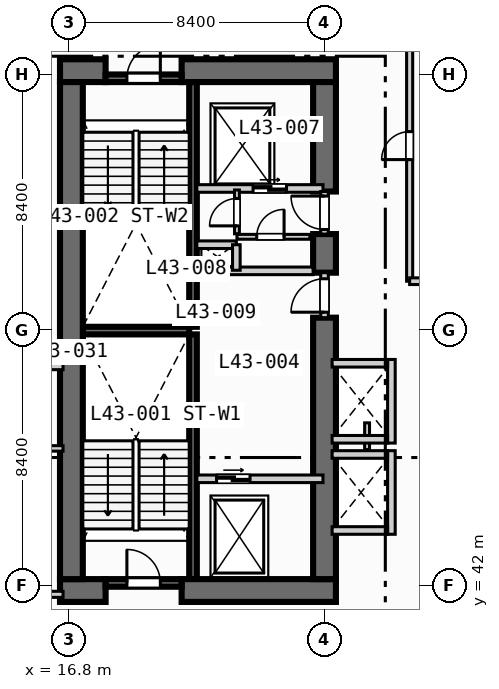
"""IFC4 building model, lengths in metres.
Left out: names, types, materials, properties, quantities, classifications, styles, units other than length and angle.
Written with IfcOpenShell. Run it as: python <this file> out.ifc"""

import sys

from ifc_helpers import new_model, si_unit, direction, frame, frame_2d, origin, place, context, subcontext, project, spatial, rectangle, extrude, element, fill, save


model = new_model("IFC4")
c1 = context("Model", 3, precision=1e-05, world=origin(), true_north=direction((0.0, 1.0)))
c2 = subcontext(c1, "Body", "Model", "MODEL_VIEW")
j1 = project(units=[si_unit("LENGTHUNIT", "METRE"), si_unit("PLANEANGLEUNIT", "RADIAN")], contexts=[c1])
p1 = place(None, origin())
s1 = spatial("IfcSite", under=j1, at=p1, CompositionType="ELEMENT")
p2 = place(p1, origin())
s2 = spatial("IfcBuilding", under=s1, at=p2, CompositionType="ELEMENT")
p3 = place(p2, frame((0.0, 0.0, 179.1)))
s3 = spatial("IfcBuildingStorey", under=s2, at=p3, CompositionType="ELEMENT", Elevation=179.1)
for number, where, z_axis, x_axis in (
    (1, (20.875, 42.2, 0.0), (0.0, 0.0, 1.0), (0.0, 1.0, 0.0)),
    (2, (20.875, 50.5, 0.0), (0.0, 0.0, 1.0), (0.0, 1.0, 0.0)),
):
    element("IfcWall", number, at=place(p3, frame(where, z_axis=z_axis, x_axis=x_axis)), inside=s3, PredefinedType="SOLIDWALL", context=c2, shape_type="SweptSolid", body=[
        extrude(rectangle(XDim=8.05, YDim=0.25, at=frame_2d((4.025, 0.0))), origin(), (0.0, 0.0, 1.0), 3.47),
    ])
p4 = place(p3, frame((17.25, 50.375, 0.0), z_axis=(0.0, 0.0, 1.0), x_axis=(1.0, 0.0, 0.0)))
e3 = element("IfcWall", 3, at=p4, inside=s3, PredefinedType="SOLIDWALL", context=c2, shape_type="SweptSolid", body=[
    extrude(rectangle(XDim=3.5, YDim=0.25, at=frame_2d((1.75, 0.0))), origin(), (0.0, 0.0, 1.0), 3.47),
])
p5 = place(p3, frame((16.5, 41.825, 0.0), z_axis=(0.0, 0.0, 1.0), x_axis=(1.0, 0.0, 0.0)))
e4 = element("IfcWall", 4, at=p5, inside=s3, PredefinedType="SHEAR", context=c2, shape_type="SweptSolid", body=[
    extrude(rectangle(XDim=1.5, YDim=0.75, at=frame_2d((0.75, 0.0))), origin(), (0.0, 0.0, 1.0), 3.47),
])
p6 = place(p3, frame((20.5, 41.825, 0.0), z_axis=(0.0, 0.0, 1.0), x_axis=(1.0, 0.0, 0.0)))
e5 = element("IfcWall", 5, at=p6, inside=s3, PredefinedType="SHEAR", context=c2, shape_type="SweptSolid", body=[
    extrude(rectangle(XDim=5.075, YDim=0.75, at=frame_2d((2.538, 0.0))), origin(), (0.0, 0.0, 1.0), 3.47),
])
p7 = place(p3, frame((16.5, 58.925, 0.0), z_axis=(0.0, 0.0, 1.0), x_axis=(1.0, 0.0, 0.0)))
e6 = element("IfcWall", 6, at=p7, inside=s3, PredefinedType="SHEAR", context=c2, shape_type="SweptSolid", body=[
    extrude(rectangle(XDim=1.5, YDim=0.75, at=frame_2d((0.75, 0.0))), origin(), (0.0, 0.0, 1.0), 3.47),
])
p8 = place(p3, frame((20.5, 58.925, 0.0), z_axis=(0.0, 0.0, 1.0), x_axis=(1.0, 0.0, 0.0)))
e7 = element("IfcWall", 7, at=p8, inside=s3, PredefinedType="SHEAR", context=c2, shape_type="SweptSolid", body=[
    extrude(rectangle(XDim=5.075, YDim=0.75, at=frame_2d((2.538, 0.0))), origin(), (0.0, 0.0, 1.0), 3.47),
])
p9 = place(p3, frame((16.875, 42.2, 0.0), z_axis=(0.0, 0.0, 1.0), x_axis=(0.0, 1.0, 0.0)))
e8 = element("IfcWall", 8, at=p9, inside=s3, PredefinedType="SHEAR", context=c2, shape_type="SweptSolid", body=[
    extrude(rectangle(XDim=16.35, YDim=0.75, at=frame_2d((8.175, 0.0))), origin(), (0.0, 0.0, 1.0), 3.47),
])
p10 = place(p3, frame((25.2, 42.2, 0.0), z_axis=(0.0, 0.0, 1.0), x_axis=(0.0, 1.0, 0.0)))
e9 = element("IfcWall", 9, at=p10, inside=s3, PredefinedType="SHEAR", context=c2, shape_type="SweptSolid", body=[
    extrude(rectangle(XDim=8.6, YDim=0.75, at=frame_2d((4.3, 0.0))), origin(), (0.0, 0.0, 1.0), 3.47),
])
p11 = place(p3, frame((25.2, 52.28, 0.0), z_axis=(0.0, 0.0, 1.0), x_axis=(0.0, 1.0, 0.0)))
e10 = element("IfcWall", 10, at=p11, inside=s3, PredefinedType="SHEAR", context=c2, shape_type="SweptSolid", body=[
    extrude(rectangle(XDim=1.27, YDim=0.75, at=frame_2d((0.635, 0.0))), origin(), (0.0, 0.0, 1.0), 3.47),
])
p12 = place(p3, frame((25.2, 54.95, 0.0), z_axis=(0.0, 0.0, 1.0), x_axis=(0.0, 1.0, 0.0)))
e11 = element("IfcWall", 11, at=p12, inside=s3, PredefinedType="SHEAR", context=c2, shape_type="SweptSolid", body=[
    extrude(rectangle(XDim=3.6, YDim=0.75, at=frame_2d((1.8, 0.0))), origin(), (0.0, 0.0, 1.0), 3.47),
])
p13 = place(p3, frame((18.0, 42.075, 0.0), z_axis=(0.0, 0.0, 1.0), x_axis=(1.0, 0.0, 0.0)))
e12 = element("IfcWall", 12, at=p13, inside=s3, PredefinedType="SOLIDWALL", context=c2, shape_type="SweptSolid", body=[
    extrude(rectangle(XDim=2.5, YDim=0.25, at=frame_2d((1.25, 0.0))), origin(), (0.0, 0.0, 1.0), 3.47),
])
p14 = place(p13, frame((0.7, 0.0, 0.0)))
e13 = element("IfcOpeningElement", 13, at=p14, cuts=e12, PredefinedType="OPENING", context=c2, shape_type="SweptSolid", body=[
    extrude(rectangle(XDim=1.1, YDim=2.15, at=frame_2d((0.55, 1.075))), frame((0.0, 0.135, 0.0), z_axis=(0.0, -1.0, 0.0), x_axis=(1.0, 0.0, 0.0)), (0.0, 0.0, 1.0), 0.27),
])
p15 = place(p3, frame((18.0, 58.675, 0.0), z_axis=(0.0, 0.0, 1.0), x_axis=(1.0, 0.0, 0.0)))
e14 = element("IfcWall", 14, at=p15, inside=s3, PredefinedType="SOLIDWALL", context=c2, shape_type="SweptSolid", body=[
    extrude(rectangle(XDim=2.5, YDim=0.25, at=frame_2d((1.25, 0.0))), origin(), (0.0, 0.0, 1.0), 3.47),
])
p16 = place(p15, frame((0.7, 0.0, 0.0)))
e15 = element("IfcOpeningElement", 15, at=p16, cuts=e14, PredefinedType="OPENING", context=c2, shape_type="SweptSolid", body=[
    extrude(rectangle(XDim=1.1, YDim=2.15, at=frame_2d((0.55, 1.075))), frame((0.0, 0.135, 0.0), z_axis=(0.0, -1.0, 0.0), x_axis=(1.0, 0.0, 0.0)), (0.0, 0.0, 1.0), 0.27),
])
p17 = place(p3, frame((21.0, 45.5, 0.0), z_axis=(0.0, 0.0, 1.0), x_axis=(1.0, 0.0, 0.0)))
e16 = element("IfcWall", 16, at=p17, inside=s3, PredefinedType="SOLIDWALL", context=c2, shape_type="SweptSolid", body=[
    extrude(rectangle(XDim=4.15, YDim=0.25, at=frame_2d((2.075, 0.0))), origin(), (0.0, 0.0, 1.0), 3.47),
])
p18 = place(p17, frame((0.65, 0.0, 0.0)))
e17 = element("IfcOpeningElement", 17, at=p18, cuts=e16, PredefinedType="OPENING", context=c2, shape_type="SweptSolid", body=[
    extrude(rectangle(XDim=1.1, YDim=2.15, at=frame_2d((0.55, 1.075))), frame((0.0, 0.135, 0.0), z_axis=(0.0, -1.0, 0.0), x_axis=(1.0, 0.0, 0.0)), (0.0, 0.0, 1.0), 0.27),
])
p19 = place(p3, frame((25.2, 50.8, 0.0), z_axis=(0.0, 0.0, 1.0), x_axis=(0.0, 1.0, 0.0)))
e18 = element("IfcWall", 18, at=p19, inside=s3, PredefinedType="SOLIDWALL", context=c2, shape_type="SweptSolid", body=[
    extrude(rectangle(XDim=1.48, YDim=0.25, at=frame_2d((0.74, 0.0))), origin(), (0.0, 0.0, 1.0), 3.47),
])
p20 = place(p19, frame((0.18, 0.0, 0.0)))
e19 = element("IfcOpeningElement", 19, at=p20, cuts=e18, PredefinedType="OPENING", context=c2, shape_type="SweptSolid", body=[
    extrude(rectangle(XDim=1.1, YDim=2.15, at=frame_2d((0.55, 1.075))), frame((0.0, 0.135, 0.0), z_axis=(0.0, -1.0, 0.0), x_axis=(1.0, 0.0, 0.0)), (0.0, 0.0, 1.0), 0.27),
])
p21 = place(p3, frame((21.0, 52.34, 0.0), z_axis=(0.0, 0.0, 1.0), x_axis=(1.0, 0.0, 0.0)))
e20 = element("IfcWall", 20, at=p21, inside=s3, PredefinedType="SOLIDWALL", context=c2, shape_type="SweptSolid", body=[
    extrude(rectangle(XDim=3.825, YDim=0.25, at=frame_2d((1.913, 0.0))), origin(), (0.0, 0.0, 1.0), 3.47),
])
p22 = place(p3, frame((21.0, 55.05, 0.0), z_axis=(0.0, 0.0, 1.0), x_axis=(1.0, 0.0, 0.0)))
e21 = element("IfcWall", 21, at=p22, inside=s3, PredefinedType="SOLIDWALL", context=c2, shape_type="SweptSolid", body=[
    extrude(rectangle(XDim=4.15, YDim=0.25, at=frame_2d((2.075, 0.0))), origin(), (0.0, 0.0, 1.0), 3.47),
])
p23 = place(p22, frame((1.85, 0.0, 0.0)))
e22 = element("IfcOpeningElement", 22, at=p23, cuts=e21, PredefinedType="OPENING", context=c2, shape_type="SweptSolid", body=[
    extrude(rectangle(XDim=1.1, YDim=2.15, at=frame_2d((0.55, 1.075))), frame((0.0, 0.135, 0.0), z_axis=(0.0, -1.0, 0.0), x_axis=(1.0, 0.0, 0.0)), (0.0, 0.0, 1.0), 0.27),
])
p24 = place(p3, frame((25.2, 53.55, 0.0), z_axis=(0.0, 0.0, 1.0), x_axis=(0.0, 1.0, 0.0)))
e23 = element("IfcWall", 23, at=p24, inside=s3, PredefinedType="SOLIDWALL", context=c2, shape_type="SweptSolid", body=[
    extrude(rectangle(XDim=1.4, YDim=0.25, at=frame_2d((0.7, 0.0))), origin(), (0.0, 0.0, 1.0), 3.47),
])
p25 = place(p24, frame((0.15, 0.0, 0.0)))
e24 = element("IfcOpeningElement", 24, at=p25, cuts=e23, PredefinedType="OPENING", context=c2, shape_type="SweptSolid", body=[
    extrude(rectangle(XDim=1.1, YDim=2.15, at=frame_2d((0.55, 1.075))), frame((0.0, 0.135, 0.0), z_axis=(0.0, -1.0, 0.0), x_axis=(1.0, 0.0, 0.0)), (0.0, 0.0, 1.0), 0.27),
])
p26 = place(p3, frame((21.0, 53.2, 0.0), z_axis=(0.0, 0.0, 1.0), x_axis=(1.0, 0.0, 0.0)))
e25 = element("IfcWall", 25, at=p26, inside=s3, PredefinedType="SOLIDWALL", context=c2, shape_type="SweptSolid", body=[
    extrude(rectangle(XDim=1.3, YDim=0.25, at=frame_2d((0.65, 0.0))), origin(), (0.0, 0.0, 1.0), 3.47),
])
p27 = place(p3, frame((22.3, 52.36, 0.0), z_axis=(0.0, 0.0, 1.0), x_axis=(0.0, 1.0, 0.0)))
e26 = element("IfcWall", 26, at=p27, inside=s3, PredefinedType="SOLIDWALL", context=c2, shape_type="SweptSolid", body=[
    extrude(rectangle(XDim=0.84, YDim=0.25, at=frame_2d((0.42, 0.0))), origin(), (0.0, 0.0, 1.0), 3.47),
])
p28 = place(p3, frame((22.32, 53.56, 0.0), z_axis=(0.0, 0.0, 1.0), x_axis=(0.0, 1.0, 0.0)))
e27 = element("IfcWall", 27, at=p28, inside=s3, PredefinedType="PARTITIONING", context=c2, shape_type="SweptSolid", body=[
    extrude(rectangle(XDim=1.44, YDim=0.16, at=frame_2d((0.72, 0.0))), origin(), (0.0, 0.0, 1.0), 3.47),
])
p29 = place(p28, frame((0.26, 0.0, 0.0)))
e28 = element("IfcOpeningElement", 28, at=p29, cuts=e27, PredefinedType="OPENING", context=c2, shape_type="SweptSolid", body=[
    extrude(rectangle(XDim=0.9, YDim=2.1, at=frame_2d((0.45, 1.05))), frame((0.0, 0.09, 0.0), z_axis=(0.0, -1.0, 0.0), x_axis=(1.0, 0.0, 0.0)), (0.0, 0.0, 1.0), 0.18),
])
p30 = place(p3, frame((22.32, 53.46, 0.0), z_axis=(0.0, 0.0, 1.0), x_axis=(1.0, 0.0, 0.0)))
e29 = element("IfcWall", 29, at=p30, inside=s3, PredefinedType="PARTITIONING", context=c2, shape_type="SweptSolid", body=[
    extrude(rectangle(XDim=2.4, YDim=0.16, at=frame_2d((1.2, 0.0))), origin(), (0.0, 0.0, 1.0), 3.47),
])
p31 = place(p30, frame((0.65, 0.0, 0.0)))
e30 = element("IfcOpeningElement", 30, at=p31, cuts=e29, PredefinedType="OPENING", context=c2, shape_type="SweptSolid", body=[
    extrude(rectangle(XDim=0.9, YDim=2.1, at=frame_2d((0.45, 1.05))), frame((0.0, 0.09, 0.0), z_axis=(0.0, -1.0, 0.0), x_axis=(1.0, 0.0, 0.0)), (0.0, 0.0, 1.0), 0.18),
])
p32 = place(p3, frame((27.4, 43.675, 0.0), z_axis=(0.0, 0.0, 1.0), x_axis=(0.0, 1.0, 0.0)))
e31 = element("IfcWall", 31, at=p32, inside=s3, PredefinedType="SOLIDWALL", context=c2, shape_type="SweptSolid", body=[
    extrude(rectangle(XDim=2.75, YDim=0.25, at=frame_2d((1.375, 0.0))), origin(), (0.0, 0.0, 1.0), 3.47),
])
for number, where, z_axis, x_axis in (
    (32, (25.45, 43.8, 0.0), (0.0, 0.0, 1.0), (1.0, 0.0, 0.0)),
    (33, (25.45, 46.3, 0.0), (0.0, 0.0, 1.0), (1.0, 0.0, 0.0)),
):
    element("IfcWall", number, at=place(p3, frame(where, z_axis=z_axis, x_axis=x_axis)), inside=s3, PredefinedType="SOLIDWALL", context=c2, shape_type="SweptSolid", body=[
        extrude(rectangle(XDim=1.825, YDim=0.25, at=frame_2d((0.913, 0.0))), origin(), (0.0, 0.0, 1.0), 3.47),
    ])
p33 = place(p3, frame((26.6, 46.46, 0.0), z_axis=(0.0, 0.0, 1.0), x_axis=(0.0, 1.0, 0.0)))
e34 = element("IfcWall", 34, at=p33, inside=s3, PredefinedType="PARTITIONING", context=c2, shape_type="SweptSolid", body=[
    extrude(rectangle(XDim=0.88, YDim=0.16, at=frame_2d((0.44, 0.0))), origin(), (0.0, 0.0, 1.0), 3.47),
])
p34 = place(p3, frame((27.4, 46.675, 0.0), z_axis=(0.0, 0.0, 1.0), x_axis=(0.0, 1.0, 0.0)))
e35 = element("IfcWall", 35, at=p34, inside=s3, PredefinedType="SOLIDWALL", context=c2, shape_type="SweptSolid", body=[
    extrude(rectangle(XDim=2.75, YDim=0.25, at=frame_2d((1.375, 0.0))), origin(), (0.0, 0.0, 1.0), 3.47),
])
for number, where, z_axis, x_axis in (
    (36, (25.45, 46.8, 0.0), (0.0, 0.0, 1.0), (1.0, 0.0, 0.0)),
    (37, (25.45, 49.3, 0.0), (0.0, 0.0, 1.0), (1.0, 0.0, 0.0)),
):
    element("IfcWall", number, at=place(p3, frame(where, z_axis=z_axis, x_axis=x_axis)), inside=s3, PredefinedType="SOLIDWALL", context=c2, shape_type="SweptSolid", body=[
        extrude(rectangle(XDim=1.825, YDim=0.25, at=frame_2d((0.913, 0.0))), origin(), (0.0, 0.0, 1.0), 3.47),
    ])
p35 = place(p3, frame((0.35, 41.7, 0.0), z_axis=(0.0, 0.0, 1.0), x_axis=(1.0, 0.0, 0.0)))
e38 = element("IfcWall", 38, at=p35, inside=s3, PredefinedType="PARTITIONING", context=c2, shape_type="SweptSolid", body=[
    extrude(rectangle(XDim=16.25, YDim=0.2, at=frame_2d((8.125, 0.0))), origin(), (0.0, 0.0, 1.0), 2.82),
])
p36 = place(p35, frame((14.2, 0.0, 0.0)))
e39 = element("IfcOpeningElement", 39, at=p36, cuts=e38, PredefinedType="OPENING", context=c2, shape_type="SweptSolid", body=[
    extrude(rectangle(XDim=1.0, YDim=2.15, at=frame_2d((0.5, 1.075))), frame((0.0, 0.11, 0.0), z_axis=(0.0, -1.0, 0.0), x_axis=(1.0, 0.0, 0.0)), (0.0, 0.0, 1.0), 0.22),
])
p37 = place(p3, frame((0.35, 49.2, 0.0), z_axis=(0.0, 0.0, 1.0), x_axis=(1.0, 0.0, 0.0)))
e40 = element("IfcWall", 40, at=p37, inside=s3, PredefinedType="PARTITIONING", context=c2, shape_type="SweptSolid", body=[
    extrude(rectangle(XDim=16.25, YDim=0.22, at=frame_2d((8.125, 0.0))), origin(), (0.0, 0.0, 1.0), 3.47),
])
p38 = place(p3, frame((11.6, 46.5, 0.0), z_axis=(0.0, 0.0, 1.0), x_axis=(1.0, 0.0, 0.0)))
e41 = element("IfcWall", 41, at=p38, inside=s3, PredefinedType="PLUMBINGWALL", context=c2, shape_type="SweptSolid", body=[
    extrude(rectangle(XDim=5.0, YDim=0.18, at=frame_2d((2.5, 0.0))), origin(), (0.0, 0.0, 1.0), 3.47),
])
p39 = place(p38, frame((0.7, 0.0, 0.0)))
e42 = element("IfcOpeningElement", 42, at=p39, cuts=e41, PredefinedType="OPENING", context=c2, shape_type="SweptSolid", body=[
    extrude(rectangle(XDim=0.9, YDim=2.1, at=frame_2d((0.45, 1.05))), frame((0.0, 0.1, 0.0), z_axis=(0.0, -1.0, 0.0), x_axis=(1.0, 0.0, 0.0)), (0.0, 0.0, 1.0), 0.2),
])
p40 = place(p38, frame((3.15, 0.0, 0.0)))
e43 = element("IfcOpeningElement", 43, at=p40, cuts=e41, PredefinedType="OPENING", context=c2, shape_type="SweptSolid", body=[
    extrude(rectangle(XDim=0.92, YDim=2.1, at=frame_2d((0.46, 1.05))), frame((0.0, 0.1, 0.0), z_axis=(0.0, -1.0, 0.0), x_axis=(1.0, 0.0, 0.0)), (0.0, 0.0, 1.0), 0.2),
])
p41 = place(p3, frame((28.0, 52.0, 0.0), z_axis=(0.0, 0.0, 1.0), x_axis=(0.0, 1.0, 0.0)))
e44 = element("IfcWall", 44, at=p41, inside=s3, PredefinedType="PARTITIONING", context=c2, shape_type="SweptSolid", body=[
    extrude(rectangle(XDim=20.2, YDim=0.2, at=frame_2d((10.1, 0.0))), origin(), (0.0, 0.0, 1.0), 3.47),
])
p42 = place(p41, frame((4.0, 0.0, 0.0)))
e45 = element("IfcOpeningElement", 45, at=p42, cuts=e44, PredefinedType="OPENING", context=c2, shape_type="SweptSolid", body=[
    extrude(rectangle(XDim=0.92, YDim=2.1, at=frame_2d((0.46, 1.05))), frame((0.0, 0.11, 0.0), z_axis=(0.0, -1.0, 0.0), x_axis=(1.0, 0.0, 0.0)), (0.0, 0.0, 1.0), 0.22),
])
p43 = place(p3, frame((28.0, 52.0, 0.0), z_axis=(0.0, 0.0, 1.0), x_axis=(1.0, 0.0, 0.0)))
e46 = element("IfcWall", 46, at=p43, inside=s3, PredefinedType="PARTITIONING", context=c2, shape_type="SweptSolid", body=[
    extrude(rectangle(XDim=5.3, YDim=0.22, at=frame_2d((2.65, 0.0))), origin(), (0.0, 0.0, 1.0), 3.47),
])
p44 = place(p14, origin())
e47 = element("IfcDoor", 47, at=p44, inside=s3, OperationType="SINGLE_SWING_LEFT", PredefinedType="DOOR", context=c2, shape_type="SweptSolid", body=[
    extrude(rectangle(XDim=1.1, YDim=2.15, at=frame_2d((0.55, 1.075))), frame((0.0, 0.025, 0.0), z_axis=(0.0, -1.0, 0.0), x_axis=(1.0, 0.0, 0.0)), (0.0, 0.0, 1.0), 0.05),
])
fill(e13, e47)
p45 = place(p16, origin())
e48 = element("IfcDoor", 48, at=p45, inside=s3, OperationType="SINGLE_SWING_RIGHT", PredefinedType="DOOR", context=c2, shape_type="SweptSolid", body=[
    extrude(rectangle(XDim=1.1, YDim=2.15, at=frame_2d((0.55, 1.075))), frame((0.0, 0.025, 0.0), z_axis=(0.0, -1.0, 0.0), x_axis=(1.0, 0.0, 0.0)), (0.0, 0.0, 1.0), 0.05),
])
fill(e15, e48)
p46 = place(p18, origin())
e49 = element("IfcDoor", 49, at=p46, inside=s3, OperationType="SLIDING_TO_LEFT", PredefinedType="DOOR", context=c2, shape_type="SweptSolid", body=[
    extrude(rectangle(XDim=1.1, YDim=2.15, at=frame_2d((0.55, 1.075))), frame((0.0, 0.025, 0.0), z_axis=(0.0, -1.0, 0.0), x_axis=(1.0, 0.0, 0.0)), (0.0, 0.0, 1.0), 0.05),
])
fill(e17, e49)
p47 = place(p20, origin())
e50 = element("IfcDoor", 50, at=p47, inside=s3, OperationType="SINGLE_SWING_LEFT", PredefinedType="DOOR", context=c2, shape_type="SweptSolid", body=[
    extrude(rectangle(XDim=1.1, YDim=2.15, at=frame_2d((0.55, 1.075))), frame((0.0, 0.025, 0.0), z_axis=(0.0, -1.0, 0.0), x_axis=(1.0, 0.0, 0.0)), (0.0, 0.0, 1.0), 0.05),
])
fill(e19, e50)
p48 = place(p23, origin())
e51 = element("IfcDoor", 51, at=p48, inside=s3, OperationType="SLIDING_TO_LEFT", PredefinedType="DOOR", context=c2, shape_type="SweptSolid", body=[
    extrude(rectangle(XDim=1.1, YDim=2.15, at=frame_2d((0.55, 1.075))), frame((0.0, 0.025, 0.0), z_axis=(0.0, -1.0, 0.0), x_axis=(1.0, 0.0, 0.0)), (0.0, 0.0, 1.0), 0.05),
])
fill(e22, e51)
p49 = place(p25, origin())
e52 = element("IfcDoor", 52, at=p49, inside=s3, OperationType="SINGLE_SWING_RIGHT", PredefinedType="DOOR", context=c2, shape_type="SweptSolid", body=[
    extrude(rectangle(XDim=1.1, YDim=2.15, at=frame_2d((0.55, 1.075))), frame((0.0, 0.025, 0.0), z_axis=(0.0, -1.0, 0.0), x_axis=(1.0, 0.0, 0.0)), (0.0, 0.0, 1.0), 0.05),
])
fill(e24, e52)
p50 = place(p29, origin())
e53 = element("IfcDoor", 53, at=p50, inside=s3, OperationType="SINGLE_SWING_LEFT", PredefinedType="DOOR", context=c2, shape_type="SweptSolid", body=[
    extrude(rectangle(XDim=0.9, YDim=2.1, at=frame_2d((0.45, 1.05))), frame((0.0, 0.025, 0.0), z_axis=(0.0, -1.0, 0.0), x_axis=(1.0, 0.0, 0.0)), (0.0, 0.0, 1.0), 0.05),
])
fill(e28, e53)
p51 = place(p31, origin())
e54 = element("IfcDoor", 54, at=p51, inside=s3, OperationType="SINGLE_SWING_RIGHT", PredefinedType="DOOR", context=c2, shape_type="SweptSolid", body=[
    extrude(rectangle(XDim=0.9, YDim=2.1, at=frame_2d((0.45, 1.05))), frame((0.0, 0.025, 0.0), z_axis=(0.0, -1.0, 0.0), x_axis=(1.0, 0.0, 0.0)), (0.0, 0.0, 1.0), 0.05),
])
fill(e30, e54)
p52 = place(p42, origin())
e55 = element("IfcDoor", 55, at=p52, inside=s3, OperationType="SINGLE_SWING_LEFT", PredefinedType="DOOR", context=c2, shape_type="SweptSolid", body=[
    extrude(rectangle(XDim=0.92, YDim=2.1, at=frame_2d((0.46, 1.05))), frame((0.0, 0.025, 0.0), z_axis=(0.0, -1.0, 0.0), x_axis=(1.0, 0.0, 0.0)), (0.0, 0.0, 1.0), 0.05),
])
fill(e45, e55)
save(model, sys.argv[1])
